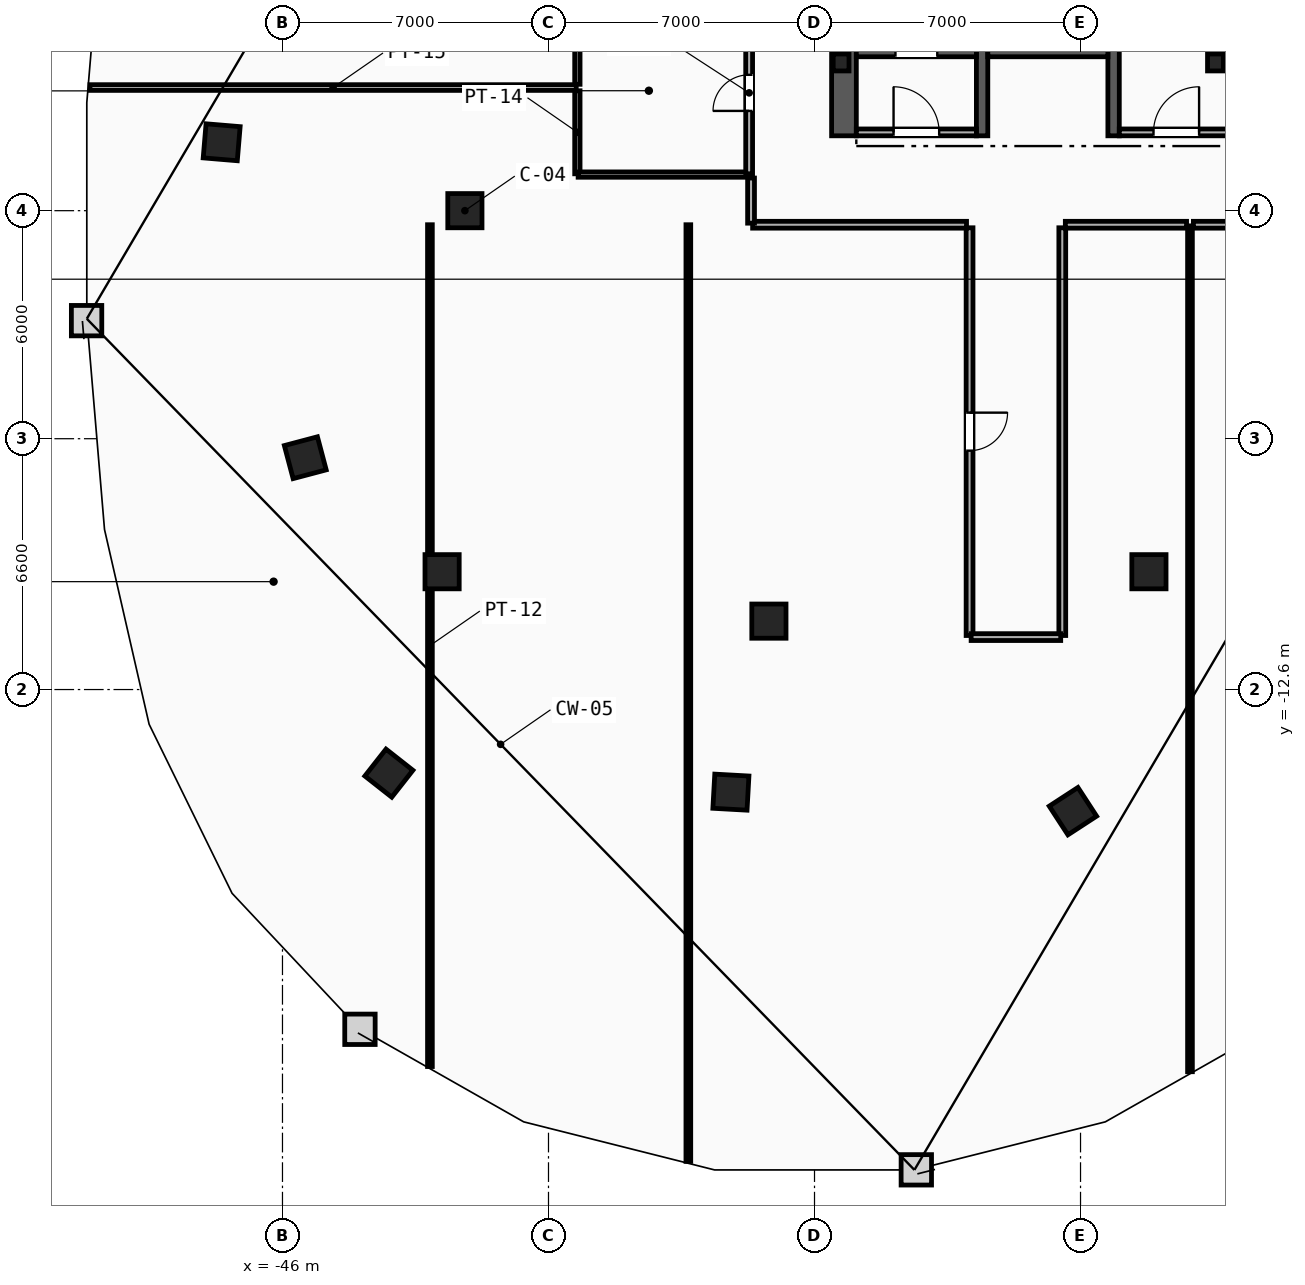
"""IFC4 building model, lengths in metres.
Left out: names, types, materials, properties, quantities, classifications, styles, units other than length and angle.
Written with IfcOpenShell. Run it as: python <this file> out.ifc"""

import sys

from ifc_helpers import new_model, si_unit, direction, frame, frame_2d, origin, origin_2d, place, context, subcontext, project, spatial, rectangle, i_section, extrude, element, fill, save


model = new_model("IFC4")
c1 = context("Model", 3, precision=1e-05, world=origin(), true_north=direction((0.0, 1.0)))
c2 = subcontext(c1, "Body", "Model", "MODEL_VIEW")
j1 = project(units=[si_unit("LENGTHUNIT", "METRE"), si_unit("PLANEANGLEUNIT", "RADIAN")], contexts=[c1])
p1 = place(None, origin())
s1 = spatial("IfcSite", under=j1, at=p1, CompositionType="ELEMENT")
p2 = place(p1, origin())
s2 = spatial("IfcBuilding", under=s1, at=p2, CompositionType="ELEMENT")
p3 = place(p2, frame((0.0, 0.0, 199.0)))
s3 = spatial("IfcBuildingStorey", under=s2, at=p3, CompositionType="ELEMENT", Elevation=199.0)
for number, where, z_axis, x_axis in (
    (1, (-31.3, 3.9, 0.0), (0.0, 0.0, 1.0), (1.0, 0.0, 0.0)),
    (2, (-21.45, 3.9, 0.0), (0.0, 0.0, 1.0), (1.0, 0.0, 0.0)),
):
    element("IfcColumn", number, at=place(p3, frame(where, z_axis=z_axis, x_axis=x_axis)), inside=s3, PredefinedType="COLUMN", context=c2, shape_type="SweptSolid", body=[
        extrude(i_section(OverallWidth=0.416, OverallDepth=0.446, WebThickness=0.039, FlangeThickness=0.063, FilletRadius=0.018, at=origin_2d()), origin(), (0.0, 0.0, 1.0), 3.6),
    ])
for number, where, z_axis, x_axis in (
    (3, (-41.2, 0.0, 0.0), (0.0, 0.0, 1.0), (1.0, 0.0, 0.0)),
    (4, (-41.8, -9.5, 0.0), (0.0, 0.0, 1.0), (1.0, 0.0, 0.0)),
    (5, (-33.2, -10.8, 0.0), (0.0, 0.0, 1.0), (1.0, 0.0, 0.0)),
    (6, (-23.2, -9.5, 0.0), (0.0, 0.0, 1.0), (1.0, 0.0, 0.0)),
    (7, (-47.6, 1.8, 0.0), (0.0, 0.0, 1.0), (-0.084, -0.997, 0.0)),
    (8, (-45.4, -6.5, 0.0), (0.0, 0.0, 1.0), (0.256, -0.967, 0.0)),
    (9, (-43.2, -14.8, 0.0), (0.0, 0.0, 1.0), (0.786, -0.618, 0.0)),
    (10, (-34.2, -15.3, 0.0), (0.0, 0.0, 1.0), (0.998, -0.055, 0.0)),
    (11, (-25.2, -15.8, 0.0), (0.0, 0.0, 1.0), (0.838, 0.546, 0.0)),
):
    element("IfcColumn", number, at=place(p3, frame(where, z_axis=z_axis, x_axis=x_axis)), inside=s3, PredefinedType="COLUMN", context=c2, shape_type="SweptSolid", body=[
        extrude(rectangle(XDim=0.9, YDim=0.9, at=origin_2d()), origin(), (0.0, 0.0, 1.0), 3.6),
    ])
p4 = place(p3, frame((-31.225, 1.97, 0.0), z_axis=(0.0, 0.0, 1.0), x_axis=(0.0, 1.0, 0.0)))
e12 = element("IfcWall", 12, at=p4, inside=s3, PredefinedType="SHEAR", context=c2, shape_type="SweptSolid", body=[
    extrude(rectangle(XDim=13.33, YDim=0.65, at=frame_2d((6.665, 0.0))), origin(), (0.0, 0.0, 1.0), 3.34),
])
for number, where, z_axis, x_axis in (
    (13, (-27.59, 1.97, 0.0), (0.0, 0.0, 1.0), (0.0, 1.0, 0.0)),
    (14, (-24.13, 1.97, 0.0), (0.0, 0.0, 1.0), (0.0, 1.0, 0.0)),
):
    element("IfcWall", number, at=place(p3, frame(where, z_axis=z_axis, x_axis=x_axis)), inside=s3, PredefinedType="SHEAR", context=c2, shape_type="SweptSolid", body=[
        extrude(rectangle(XDim=10.68, YDim=0.3, at=frame_2d((5.34, 0.0))), origin(), (0.0, 0.0, 1.0), 3.34),
    ])
p5 = place(p3, frame((-30.9, 4.2, 0.0), z_axis=(0.0, 0.0, 1.0), x_axis=(1.0, 0.0, 0.0)))
e15 = element("IfcWall", 15, at=p5, inside=s3, PredefinedType="SHEAR", context=c2, shape_type="SweptSolid", body=[
    extrude(rectangle(XDim=3.16, YDim=0.3, at=frame_2d((1.58, 0.0))), origin(), (0.0, 0.0, 1.0), 3.34),
])
p6 = place(p5, frame((1.03, 0.0, 0.0)))
e16 = element("IfcOpeningElement", 16, at=p6, cuts=e15, PredefinedType="OPENING", context=c2, shape_type="SweptSolid", body=[
    extrude(rectangle(XDim=1.1, YDim=2.15, at=frame_2d((0.55, 1.075))), frame((0.0, 0.16, 0.0), z_axis=(0.0, -1.0, 0.0), x_axis=(1.0, 0.0, 0.0)), (0.0, 0.0, 1.0), 0.32),
])
p7 = place(p3, frame((-27.44, 4.2, 0.0), z_axis=(0.0, 0.0, 1.0), x_axis=(1.0, 0.0, 0.0)))
e17 = element("IfcWall", 17, at=p7, inside=s3, PredefinedType="SHEAR", context=c2, shape_type="SweptSolid", body=[
    extrude(rectangle(XDim=3.16, YDim=0.3, at=frame_2d((1.58, 0.0))), origin(), (0.0, 0.0, 1.0), 3.34),
])
p8 = place(p3, frame((-23.98, 2.06, 0.0), z_axis=(0.0, 0.0, 1.0), x_axis=(1.0, 0.0, 0.0)))
e18 = element("IfcWall", 18, at=p8, inside=s3, PredefinedType="PARTITIONING", context=c2, shape_type="SweptSolid", body=[
    extrude(rectangle(XDim=3.0, YDim=0.18, at=frame_2d((1.5, 0.0))), origin(), (0.0, 0.0, 1.0), 3.34),
])
p9 = place(p8, frame((0.9, 0.0, 0.0)))
e19 = element("IfcOpeningElement", 19, at=p9, cuts=e18, PredefinedType="OPENING", context=c2, shape_type="SweptSolid", body=[
    extrude(rectangle(XDim=1.2, YDim=2.15, at=frame_2d((0.6, 1.075))), frame((0.0, 0.1, 0.0), z_axis=(0.0, -1.0, 0.0), x_axis=(1.0, 0.0, 0.0)), (0.0, 0.0, 1.0), 0.2),
])
p10 = place(p3, frame((-30.9, 2.06, 0.0), z_axis=(0.0, 0.0, 1.0), x_axis=(1.0, 0.0, 0.0)))
e20 = element("IfcWall", 20, at=p10, inside=s3, PredefinedType="PARTITIONING", context=c2, shape_type="SweptSolid", body=[
    extrude(rectangle(XDim=3.16, YDim=0.18, at=frame_2d((1.58, 0.0))), origin(), (0.0, 0.0, 1.0), 3.34),
])
p11 = place(p10, frame((0.98, 0.0, 0.0)))
e21 = element("IfcOpeningElement", 21, at=p11, cuts=e20, PredefinedType="OPENING", context=c2, shape_type="SweptSolid", body=[
    extrude(rectangle(XDim=1.2, YDim=2.15, at=frame_2d((0.6, 1.075))), frame((0.0, 0.1, 0.0), z_axis=(0.0, -1.0, 0.0), x_axis=(1.0, 0.0, 0.0)), (0.0, 0.0, 1.0), 0.2),
])
p12 = place(p3, frame((-38.24, 0.97, 0.0), z_axis=(0.0, 0.0, 1.0), x_axis=(0.0, 1.0, 0.0)))
e22 = element("IfcWall", 22, at=p12, inside=s3, PredefinedType="PARTITIONING", context=c2, shape_type="SweptSolid", body=[
    extrude(rectangle(XDim=2.185, YDim=0.14, at=frame_2d((1.093, 0.0))), origin(), (0.0, 0.0, 1.0), 3.34),
])
p13 = place(p3, frame((-38.24, 3.325, 0.0), z_axis=(0.0, 0.0, 1.0), x_axis=(0.0, 1.0, 0.0)))
e23 = element("IfcWall", 23, at=p13, inside=s3, PredefinedType="PARTITIONING", context=c2, shape_type="SweptSolid", body=[
    extrude(rectangle(XDim=1.92, YDim=0.14, at=frame_2d((0.96, 0.0))), origin(), (0.0, 0.0, 1.0), 3.34),
])
p14 = place(p3, frame((-38.22, 0.95, 0.0), z_axis=(0.0, 0.0, 1.0), x_axis=(1.0, 0.0, 0.0)))
e24 = element("IfcWall", 24, at=p14, inside=s3, PredefinedType="PARTITIONING", context=c2, shape_type="SweptSolid", body=[
    extrude(rectangle(XDim=4.48, YDim=0.14, at=frame_2d((2.24, 0.0))), origin(), (0.0, 0.0, 1.0), 3.34),
])
p15 = place(p3, frame((-33.72, 0.97, 0.0), z_axis=(0.0, 0.0, 1.0), x_axis=(0.0, 1.0, 0.0)))
e25 = element("IfcWall", 25, at=p15, inside=s3, PredefinedType="PARTITIONING", context=c2, shape_type="SweptSolid", body=[
    extrude(rectangle(XDim=4.26, YDim=0.18, at=frame_2d((2.13, 0.0))), origin(), (0.0, 0.0, 1.0), 3.34),
])
p16 = place(p15, frame((1.655, 0.0, 0.0)))
e26 = element("IfcOpeningElement", 26, at=p16, cuts=e25, PredefinedType="OPENING", context=c2, shape_type="SweptSolid", body=[
    extrude(rectangle(XDim=0.95, YDim=2.1, at=frame_2d((0.475, 1.05))), frame((0.0, 0.1, 0.0), z_axis=(0.0, -1.0, 0.0), x_axis=(1.0, 0.0, 0.0)), (0.0, 0.0, 1.0), 0.2),
])
p17 = place(p3, frame((-42.12, -22.52, 0.0), z_axis=(0.0, 0.0, 1.0), x_axis=(0.0, 1.0, 0.0)))
e27 = element("IfcWall", 27, at=p17, inside=s3, PredefinedType="PARTITIONING", context=c2, shape_type="SweptSolid", body=[
    extrude(rectangle(XDim=22.149, YDim=0.125, at=frame_2d((11.075, 0.0))), origin(), (0.0, 0.0, 1.0), 3.34),
])
p18 = place(p3, frame((-35.32, -25.015, 0.0), z_axis=(0.0, 0.0, 1.0), x_axis=(0.0, 1.0, 0.0)))
e28 = element("IfcWall", 28, at=p18, inside=s3, PredefinedType="PARTITIONING", context=c2, shape_type="SweptSolid", body=[
    extrude(rectangle(XDim=24.645, YDim=0.125, at=frame_2d((12.323, 0.0))), origin(), (0.0, 0.0, 1.0), 3.34),
])
p19 = place(p3, frame((-22.12, -22.656, 0.0), z_axis=(0.0, 0.0, 1.0), x_axis=(0.0, 1.0, 0.0)))
e29 = element("IfcWall", 29, at=p19, inside=s3, PredefinedType="PARTITIONING", context=c2, shape_type="SweptSolid", body=[
    extrude(rectangle(XDim=22.256, YDim=0.125, at=frame_2d((11.128, 0.0))), origin(), (0.0, 0.0, 1.0), 2.724),
])
p20 = place(p3, frame((-51.066, 3.24, 0.0), z_axis=(0.0, 0.0, 1.0), x_axis=(1.0, 0.0, 0.0)))
e30 = element("IfcWall", 30, at=p20, inside=s3, PredefinedType="PARTITIONING", context=c2, shape_type="SweptSolid", body=[
    extrude(rectangle(XDim=12.796, YDim=0.15, at=frame_2d((6.398, 0.0))), origin(), (0.0, 0.0, 1.0), 3.34),
])
p21 = place(p3, frame((-27.92, -0.45, 0.0), z_axis=(0.0, 0.0, 1.0), x_axis=(0.0, -1.0, 0.0)))
e31 = element("IfcWall", 31, at=p21, inside=s3, PredefinedType="PARTITIONING", context=c2, shape_type="SweptSolid", body=[
    extrude(rectangle(XDim=10.729, YDim=0.18, at=frame_2d((5.364, 0.0))), origin(), (0.0, 0.0, 1.0), 3.34),
])
p22 = place(p21, frame((4.864, 0.0, 0.0)))
e32 = element("IfcOpeningElement", 32, at=p22, cuts=e31, PredefinedType="OPENING", context=c2, shape_type="SweptSolid", body=[
    extrude(rectangle(XDim=1.0, YDim=2.15, at=frame_2d((0.5, 1.075))), frame((0.0, 0.1, 0.0), z_axis=(0.0, -1.0, 0.0), x_axis=(1.0, 0.0, 0.0)), (0.0, 0.0, 1.0), 0.2),
])
p23 = place(p3, frame((-25.48, -11.178, 0.0), z_axis=(0.0, 0.0, 1.0), x_axis=(0.0, 1.0, 0.0)))
e33 = element("IfcWall", 33, at=p23, inside=s3, PredefinedType="PARTITIONING", context=c2, shape_type="SweptSolid", body=[
    extrude(rectangle(XDim=10.729, YDim=0.18, at=frame_2d((5.364, 0.0))), origin(), (0.0, 0.0, 1.0), 3.34),
])
p24 = place(p3, frame((-33.628, -0.37, 0.0), z_axis=(0.0, 0.0, 1.0), x_axis=(1.0, 0.0, 0.0)))
e34 = element("IfcWall", 34, at=p24, inside=s3, PredefinedType="PARTITIONING", context=c2, shape_type="SweptSolid", body=[
    extrude(rectangle(XDim=5.628, YDim=0.18, at=frame_2d((2.814, 0.0))), origin(), (0.0, 0.0, 1.0), 3.34),
])
p25 = place(p3, frame((-25.4, -0.37, 0.0), z_axis=(0.0, 0.0, 1.0), x_axis=(1.0, 0.0, 0.0)))
e35 = element("IfcWall", 35, at=p25, inside=s3, PredefinedType="PARTITIONING", context=c2, shape_type="SweptSolid", body=[
    extrude(rectangle(XDim=3.19, YDim=0.18, at=frame_2d((1.595, 0.0))), origin(), (0.0, 0.0, 1.0), 3.34),
])
p26 = place(p3, frame((-27.878, -11.22, 0.0), z_axis=(0.0, 0.0, 1.0), x_axis=(1.0, 0.0, 0.0)))
e36 = element("IfcWall", 36, at=p26, inside=s3, PredefinedType="PARTITIONING", context=c2, shape_type="SweptSolid", body=[
    extrude(rectangle(XDim=2.357, YDim=0.18, at=frame_2d((1.178, 0.0))), origin(), (0.0, 0.0, 1.0), 3.34),
])
p27 = place(p3, frame((-33.67, 0.859, 0.0), z_axis=(0.0, 0.0, 1.0), x_axis=(0.0, -1.0, 0.0)))
e37 = element("IfcWall", 37, at=p27, inside=s3, PredefinedType="PARTITIONING", context=c2, shape_type="SweptSolid", body=[
    extrude(rectangle(XDim=1.187, YDim=0.18, at=frame_2d((0.594, 0.0))), origin(), (0.0, 0.0, 1.0), 3.34),
])
p28 = place(p3, frame((-22.03, -0.37, 0.0), z_axis=(0.0, 0.0, 1.0), x_axis=(1.0, 0.0, 0.0)))
e38 = element("IfcWall", 38, at=p28, inside=s3, PredefinedType="PARTITIONING", context=c2, shape_type="SweptSolid", body=[
    extrude(rectangle(XDim=5.208, YDim=0.18, at=frame_2d((2.604, 0.0))), origin(), (0.0, 0.0, 1.0), 3.34),
])
p29 = place(p9, origin())
e39 = element("IfcDoor", 39, at=p29, inside=s3, OperationType="SINGLE_SWING_RIGHT", PredefinedType="DOOR", context=c2, shape_type="SweptSolid", body=[
    extrude(rectangle(XDim=1.2, YDim=2.15, at=frame_2d((0.6, 1.075))), frame((0.0, 0.025, 0.0), z_axis=(0.0, -1.0, 0.0), x_axis=(1.0, 0.0, 0.0)), (0.0, 0.0, 1.0), 0.05),
])
fill(e19, e39)
p30 = place(p11, origin())
e40 = element("IfcDoor", 40, at=p30, inside=s3, OperationType="SINGLE_SWING_LEFT", PredefinedType="DOOR", context=c2, shape_type="SweptSolid", body=[
    extrude(rectangle(XDim=1.2, YDim=2.15, at=frame_2d((0.6, 1.075))), frame((0.0, 0.025, 0.0), z_axis=(0.0, -1.0, 0.0), x_axis=(1.0, 0.0, 0.0)), (0.0, 0.0, 1.0), 0.05),
])
fill(e21, e40)
p31 = place(p22, origin())
e41 = element("IfcDoor", 41, at=p31, inside=s3, OperationType="SINGLE_SWING_LEFT", PredefinedType="DOOR", context=c2, shape_type="SweptSolid", body=[
    extrude(rectangle(XDim=1.0, YDim=2.15, at=frame_2d((0.5, 1.075))), frame((0.0, 0.025, 0.0), z_axis=(0.0, -1.0, 0.0), x_axis=(1.0, 0.0, 0.0)), (0.0, 0.0, 1.0), 0.05),
])
fill(e32, e41)
p32 = place(p16, origin())
e42 = element("IfcDoor", 42, at=p32, inside=s3, OperationType="SINGLE_SWING_LEFT", PredefinedType="DOOR", context=c2, shape_type="SweptSolid", body=[
    extrude(rectangle(XDim=0.95, YDim=2.1, at=frame_2d((0.475, 1.05))), frame((0.0, 0.025, 0.0), z_axis=(0.0, -1.0, 0.0), x_axis=(1.0, 0.0, 0.0)), (0.0, 0.0, 1.0), 0.05),
])
fill(e26, e42)
save(model, sys.argv[1])
